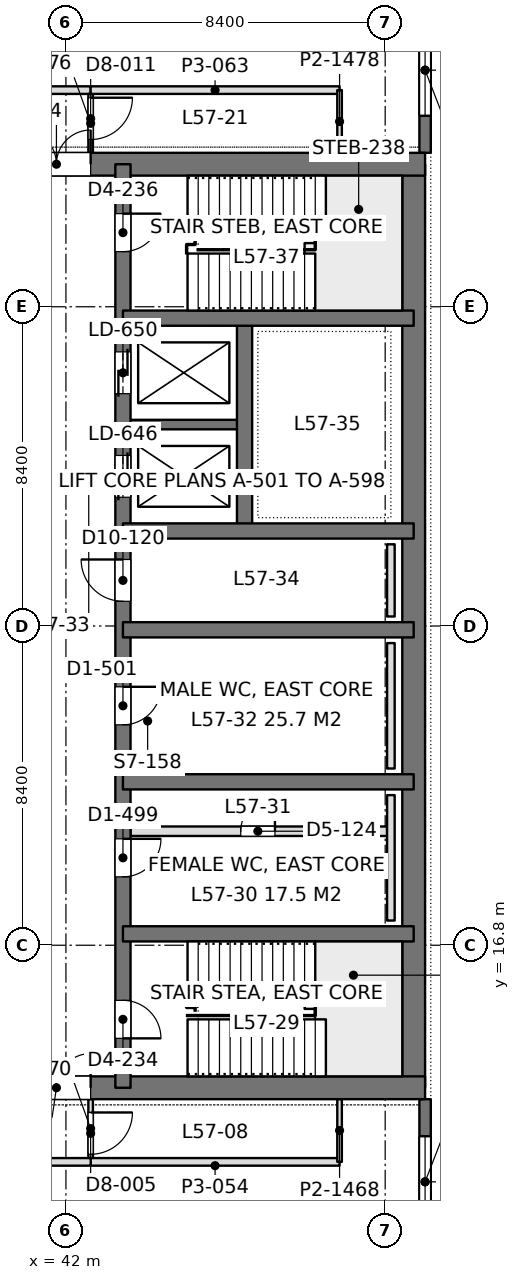
"""IFC4 building model, lengths in metres.
Left out: names, types, materials, properties, quantities, classifications, styles, units other than length and angle.
Written with IfcOpenShell. Run it as: python <this file> out.ifc"""

import sys

from ifc_helpers import new_model, si_unit, direction, frame, frame_2d, origin, place, context, subcontext, project, spatial, rectangle, extrude, element, fill, save


model = new_model("IFC4")
c1 = context("Model", 3, precision=1e-05, world=origin(), true_north=direction((0.0, 1.0)))
c2 = subcontext(c1, "Body", "Model", "MODEL_VIEW")
j1 = project(units=[si_unit("LENGTHUNIT", "METRE"), si_unit("PLANEANGLEUNIT", "RADIAN")], contexts=[c1])
p1 = place(None, origin())
s1 = spatial("IfcSite", under=j1, at=p1, CompositionType="ELEMENT")
p2 = place(p1, origin())
s2 = spatial("IfcBuilding", under=s1, at=p2, CompositionType="ELEMENT")
p3 = place(p2, frame((0.0, 0.0, 250.2)))
s3 = spatial("IfcBuildingStorey", under=s2, at=p3, CompositionType="ELEMENT", Elevation=250.2)
p4 = place(p3, frame((33.75, 13.05, 0.0), z_axis=(0.0, 0.0, 1.0), x_axis=(1.0, 0.0, 0.0)))
e1 = element("IfcWall", 1, at=p4, inside=s3, PredefinedType="SHEAR", context=c2, shape_type="SweptSolid", body=[
    extrude(rectangle(XDim=17.7, YDim=0.6, at=frame_2d((8.85, 0.0))), origin(), (0.0, 0.0, 1.0), 4.5),
])
p5 = place(p4, frame((7.1, 0.0, 0.0)))
e2 = element("IfcOpeningElement", 2, at=p5, cuts=e1, PredefinedType="OPENING", context=c2, shape_type="SweptSolid", body=[
    extrude(rectangle(XDim=1.8, YDim=2.4, at=frame_2d((0.9, 1.2))), frame((0.0, 0.31, 0.0), z_axis=(0.0, -1.0, 0.0), x_axis=(1.0, 0.0, 0.0)), (0.0, 0.0, 1.0), 0.62),
])
p6 = place(p3, frame((33.75, 37.35, 0.0), z_axis=(0.0, 0.0, 1.0), x_axis=(1.0, 0.0, 0.0)))
e3 = element("IfcWall", 3, at=p6, inside=s3, PredefinedType="SHEAR", context=c2, shape_type="SweptSolid", body=[
    extrude(rectangle(XDim=17.7, YDim=0.6, at=frame_2d((8.85, 0.0))), origin(), (0.0, 0.0, 1.0), 4.5),
])
p7 = place(p6, frame((7.1, 0.0, 0.0)))
e4 = element("IfcOpeningElement", 4, at=p7, cuts=e3, PredefinedType="OPENING", context=c2, shape_type="SweptSolid", body=[
    extrude(rectangle(XDim=1.8, YDim=2.4, at=frame_2d((0.9, 1.2))), frame((0.0, 0.31, 0.0), z_axis=(0.0, -1.0, 0.0), x_axis=(1.0, 0.0, 0.0)), (0.0, 0.0, 1.0), 0.62),
])
p8 = place(p3, frame((51.15, 13.05, 0.0), z_axis=(0.0, 0.0, 1.0), x_axis=(0.0, 1.0, 0.0)))
e5 = element("IfcWall", 5, at=p8, inside=s3, PredefinedType="SHEAR", context=c2, shape_type="SweptSolid", body=[
    extrude(rectangle(XDim=24.3, YDim=0.6, at=frame_2d((12.15, 0.0))), origin(), (0.0, 0.0, 1.0), 4.5),
])
p9 = place(p3, frame((43.5, 13.05, 0.0), z_axis=(0.0, 0.0, 1.0), x_axis=(0.0, 1.0, 0.0)))
e6 = element("IfcWall", 6, at=p9, inside=s3, PredefinedType="SHEAR", context=c2, shape_type="SweptSolid", body=[
    extrude(rectangle(XDim=24.3, YDim=0.4, at=frame_2d((12.15, 0.0))), origin(), (0.0, 0.0, 1.0), 4.5),
])
p10 = place(p9, frame((1.3, 0.0, 0.0)))
e7 = element("IfcOpeningElement", 7, at=p10, cuts=e6, PredefinedType="OPENING", context=c2, shape_type="SweptSolid", body=[
    extrude(rectangle(XDim=1.0, YDim=2.2, at=frame_2d((0.5, 1.1))), frame((0.0, 0.21, 0.0), z_axis=(0.0, -1.0, 0.0), x_axis=(1.0, 0.0, 0.0)), (0.0, 0.0, 1.0), 0.42),
])
p11 = place(p9, frame((22.0, 0.0, 0.0)))
e8 = element("IfcOpeningElement", 8, at=p11, cuts=e6, PredefinedType="OPENING", context=c2, shape_type="SweptSolid", body=[
    extrude(rectangle(XDim=1.0, YDim=2.2, at=frame_2d((0.5, 1.1))), frame((0.0, 0.21, 0.0), z_axis=(0.0, -1.0, 0.0), x_axis=(1.0, 0.0, 0.0)), (0.0, 0.0, 1.0), 0.42),
])
p12 = place(p9, frame((5.55, 0.0, 0.0)))
e9 = element("IfcOpeningElement", 9, at=p12, cuts=e6, PredefinedType="OPENING", context=c2, shape_type="SweptSolid", body=[
    extrude(rectangle(XDim=1.0, YDim=2.2, at=frame_2d((0.5, 1.1))), frame((0.0, 0.21, 0.0), z_axis=(0.0, -1.0, 0.0), x_axis=(1.0, 0.0, 0.0)), (0.0, 0.0, 1.0), 0.42),
])
p13 = place(p9, frame((9.55, 0.0, 0.0)))
e10 = element("IfcOpeningElement", 10, at=p13, cuts=e6, PredefinedType="OPENING", context=c2, shape_type="SweptSolid", body=[
    extrude(rectangle(XDim=1.0, YDim=2.2, at=frame_2d((0.5, 1.1))), frame((0.0, 0.21, 0.0), z_axis=(0.0, -1.0, 0.0), x_axis=(1.0, 0.0, 0.0)), (0.0, 0.0, 1.0), 0.42),
])
p14 = place(p9, frame((12.8, 0.0, 0.0)))
e11 = element("IfcOpeningElement", 11, at=p14, cuts=e6, PredefinedType="OPENING", context=c2, shape_type="SweptSolid", body=[
    extrude(rectangle(XDim=1.1, YDim=2.2, at=frame_2d((0.55, 1.1))), frame((0.0, 0.21, 0.0), z_axis=(0.0, -1.0, 0.0), x_axis=(1.0, 0.0, 0.0)), (0.0, 0.0, 1.0), 0.42),
])
p15 = place(p9, frame((15.538, 0.0, 0.0)))
e12 = element("IfcOpeningElement", 12, at=p15, cuts=e6, PredefinedType="OPENING", context=c2, shape_type="SweptSolid", body=[
    extrude(rectangle(XDim=1.1, YDim=2.2, at=frame_2d((0.55, 1.1))), frame((0.0, 0.21, 0.0), z_axis=(0.0, -1.0, 0.0), x_axis=(1.0, 0.0, 0.0)), (0.0, 0.0, 1.0), 0.42),
])
p16 = place(p9, frame((18.262, 0.0, 0.0)))
e13 = element("IfcOpeningElement", 13, at=p16, cuts=e6, PredefinedType="OPENING", context=c2, shape_type="SweptSolid", body=[
    extrude(rectangle(XDim=1.1, YDim=2.2, at=frame_2d((0.55, 1.1))), frame((0.0, 0.21, 0.0), z_axis=(0.0, -1.0, 0.0), x_axis=(1.0, 0.0, 0.0)), (0.0, 0.0, 1.0), 0.42),
])
for number, where, z_axis, x_axis in (
    (14, (51.15, 17.1, 0.0), (0.0, 0.0, 1.0), (-1.0, 0.0, 0.0)),
    (15, (51.15, 21.1, 0.0), (0.0, 0.0, 1.0), (-1.0, 0.0, 0.0)),
    (16, (51.15, 25.1, 0.0), (0.0, 0.0, 1.0), (-1.0, 0.0, 0.0)),
    (17, (51.15, 27.7, 0.0), (0.0, 0.0, 1.0), (-1.0, 0.0, 0.0)),
    (18, (51.15, 33.3, 0.0), (0.0, 0.0, 1.0), (-1.0, 0.0, 0.0)),
):
    element("IfcWall", number, at=place(p3, frame(where, z_axis=z_axis, x_axis=x_axis)), inside=s3, PredefinedType="SHEAR", context=c2, shape_type="SweptSolid", body=[
        extrude(rectangle(XDim=7.65, YDim=0.4, at=frame_2d((3.825, 0.0))), origin(), (0.0, 0.0, 1.0), 4.5),
    ])
p17 = place(p3, frame((46.7, 27.7, 0.0), z_axis=(0.0, 0.0, 1.0), x_axis=(0.0, 1.0, 0.0)))
e19 = element("IfcWall", 19, at=p17, inside=s3, PredefinedType="SHEAR", context=c2, shape_type="SweptSolid", body=[
    extrude(rectangle(XDim=5.6, YDim=0.4, at=frame_2d((2.8, 0.0))), origin(), (0.0, 0.0, 1.0), 4.5),
])
p18 = place(p3, frame((46.7, 30.5, 0.0), z_axis=(0.0, 0.0, 1.0), x_axis=(-1.0, 0.0, 0.0)))
e20 = element("IfcWall", 20, at=p18, inside=s3, PredefinedType="SHEAR", context=c2, shape_type="SweptSolid", body=[
    extrude(rectangle(XDim=3.2, YDim=0.25, at=frame_2d((1.6, 0.0))), origin(), (0.0, 0.0, 1.0), 4.5),
])
p19 = place(p3, frame((51.45, 42.0, 0.0), z_axis=(0.0, 0.0, 1.0), x_axis=(0.0, -1.0, 0.0)))
e21 = element("IfcWall", 21, at=p19, inside=s3, PredefinedType="SOLIDWALL", context=c2, shape_type="SweptSolid", body=[
    extrude(rectangle(XDim=4.35, YDim=0.3, at=frame_2d((2.175, 0.0))), origin(), (0.0, 0.0, 1.0), 4.35),
])
p20 = place(p19, frame((0.975, 0.0, 0.9)))
e22 = element("IfcOpeningElement", 22, at=p20, cuts=e21, PredefinedType="OPENING", context=c2, shape_type="SweptSolid", body=[
    extrude(rectangle(XDim=2.4, YDim=1.9, at=frame_2d((1.2, 0.95))), frame((0.0, 0.16, 0.0), z_axis=(0.0, -1.0, 0.0), x_axis=(1.0, 0.0, 0.0)), (0.0, 0.0, 1.0), 0.32),
])
p21 = place(p3, frame((51.45, 12.75, 0.0), z_axis=(0.0, 0.0, 1.0), x_axis=(0.0, -1.0, 0.0)))
e23 = element("IfcWall", 23, at=p21, inside=s3, PredefinedType="SOLIDWALL", context=c2, shape_type="SweptSolid", body=[
    extrude(rectangle(XDim=4.35, YDim=0.3, at=frame_2d((2.175, 0.0))), origin(), (0.0, 0.0, 1.0), 4.35),
])
p22 = place(p21, frame((0.975, 0.0, 0.9)))
e24 = element("IfcOpeningElement", 24, at=p22, cuts=e23, PredefinedType="OPENING", context=c2, shape_type="SweptSolid", body=[
    extrude(rectangle(XDim=2.4, YDim=1.9, at=frame_2d((1.2, 0.95))), frame((0.0, 0.16, 0.0), z_axis=(0.0, -1.0, 0.0), x_axis=(1.0, 0.0, 0.0)), (0.0, 0.0, 1.0), 0.32),
])
p23 = place(p3, frame((7.748, 11.1, 0.0), z_axis=(0.0, 0.0, 1.0), x_axis=(1.0, 0.0, 0.0)))
e25 = element("IfcWall", 25, at=p23, inside=s3, PredefinedType="PARTITIONING", context=c2, shape_type="SweptSolid", body=[
    extrude(rectangle(XDim=34.904, YDim=0.2, at=frame_2d((17.452, 0.0))), origin(), (0.0, 0.0, 1.0), 3.8),
])
p24 = place(p23, frame((10.735, 0.0, 0.0)))
e26 = element("IfcOpeningElement", 26, at=p24, cuts=e25, PredefinedType="OPENING", context=c2, shape_type="SweptSolid", body=[
    extrude(rectangle(XDim=1.8, YDim=2.2, at=frame_2d((0.9, 1.1))), frame((0.0, 0.11, 0.0), z_axis=(0.0, -1.0, 0.0), x_axis=(1.0, 0.0, 0.0)), (0.0, 0.0, 1.0), 0.22),
])
p25 = place(p23, frame((22.369, 0.0, 0.0)))
e27 = element("IfcOpeningElement", 27, at=p25, cuts=e25, PredefinedType="OPENING", context=c2, shape_type="SweptSolid", body=[
    extrude(rectangle(XDim=1.8, YDim=2.2, at=frame_2d((0.9, 1.1))), frame((0.0, 0.11, 0.0), z_axis=(0.0, -1.0, 0.0), x_axis=(1.0, 0.0, 0.0)), (0.0, 0.0, 1.0), 0.22),
])
p26 = place(p3, frame((42.65, 11.198, 0.0), z_axis=(0.0, 0.0, 1.0), x_axis=(0.0, 1.0, 0.0)))
e28 = element("IfcWall", 28, at=p26, inside=s3, PredefinedType="PARTITIONING", context=c2, shape_type="SweptSolid", body=[
    extrude(rectangle(XDim=1.554, YDim=0.12, at=frame_2d((0.777, 0.0))), origin(), (0.0, 0.0, 1.0), 4.35),
])
p27 = place(p26, frame((0.102, 0.0, 0.0)))
e29 = element("IfcOpeningElement", 29, at=p27, cuts=e28, PredefinedType="OPENING", context=c2, shape_type="SweptSolid", body=[
    extrude(rectangle(XDim=1.1, YDim=2.4, at=frame_2d((0.55, 1.2))), frame((0.0, 0.07, 0.0), z_axis=(0.0, -1.0, 0.0), x_axis=(1.0, 0.0, 0.0)), (0.0, 0.0, 1.0), 0.14),
])
p28 = place(p3, frame((42.648, 11.1, 0.0), z_axis=(0.0, 0.0, 1.0), x_axis=(1.0, 0.0, 0.0)))
e30 = element("IfcWall", 30, at=p28, inside=s3, PredefinedType="PARTITIONING", context=c2, shape_type="SweptSolid", body=[
    extrude(rectangle(XDim=6.552, YDim=0.2, at=frame_2d((3.276, 0.0))), origin(), (0.0, 0.0, 1.0), 4.35),
])
p29 = place(p3, frame((49.2, 11.1, 0.0), z_axis=(0.0, 0.0, 1.0), x_axis=(0.0, 1.0, 0.0)))
e31 = element("IfcWall", 31, at=p29, inside=s3, PredefinedType="PARTITIONING", context=c2, shape_type="SweptSolid", body=[
    extrude(rectangle(XDim=1.652, YDim=0.12, at=frame_2d((0.826, 0.0))), origin(), (0.0, 0.0, 1.0), 4.35),
])
p30 = place(p3, frame((7.748, 39.3, 0.0), z_axis=(0.0, 0.0, 1.0), x_axis=(1.0, 0.0, 0.0)))
e32 = element("IfcWall", 32, at=p30, inside=s3, PredefinedType="PARTITIONING", context=c2, shape_type="SweptSolid", body=[
    extrude(rectangle(XDim=34.904, YDim=0.2, at=frame_2d((17.452, 0.0))), origin(), (0.0, 0.0, 1.0), 3.8),
])
p31 = place(p30, frame((10.735, 0.0, 0.0)))
e33 = element("IfcOpeningElement", 33, at=p31, cuts=e32, PredefinedType="OPENING", context=c2, shape_type="SweptSolid", body=[
    extrude(rectangle(XDim=1.8, YDim=2.2, at=frame_2d((0.9, 1.1))), frame((0.0, 0.11, 0.0), z_axis=(0.0, -1.0, 0.0), x_axis=(1.0, 0.0, 0.0)), (0.0, 0.0, 1.0), 0.22),
])
p32 = place(p30, frame((22.369, 0.0, 0.0)))
e34 = element("IfcOpeningElement", 34, at=p32, cuts=e32, PredefinedType="OPENING", context=c2, shape_type="SweptSolid", body=[
    extrude(rectangle(XDim=1.8, YDim=2.2, at=frame_2d((0.9, 1.1))), frame((0.0, 0.11, 0.0), z_axis=(0.0, -1.0, 0.0), x_axis=(1.0, 0.0, 0.0)), (0.0, 0.0, 1.0), 0.22),
])
p33 = place(p3, frame((42.65, 37.648, 0.0), z_axis=(0.0, 0.0, 1.0), x_axis=(0.0, 1.0, 0.0)))
e35 = element("IfcWall", 35, at=p33, inside=s3, PredefinedType="PARTITIONING", context=c2, shape_type="SweptSolid", body=[
    extrude(rectangle(XDim=1.554, YDim=0.12, at=frame_2d((0.777, 0.0))), origin(), (0.0, 0.0, 1.0), 4.35),
])
p34 = place(p33, frame((0.352, 0.0, 0.0)))
e36 = element("IfcOpeningElement", 36, at=p34, cuts=e35, PredefinedType="OPENING", context=c2, shape_type="SweptSolid", body=[
    extrude(rectangle(XDim=1.1, YDim=2.4, at=frame_2d((0.55, 1.2))), frame((0.0, 0.07, 0.0), z_axis=(0.0, -1.0, 0.0), x_axis=(1.0, 0.0, 0.0)), (0.0, 0.0, 1.0), 0.14),
])
p35 = place(p3, frame((42.648, 39.3, 0.0), z_axis=(0.0, 0.0, 1.0), x_axis=(1.0, 0.0, 0.0)))
e37 = element("IfcWall", 37, at=p35, inside=s3, PredefinedType="PARTITIONING", context=c2, shape_type="SweptSolid", body=[
    extrude(rectangle(XDim=6.552, YDim=0.2, at=frame_2d((3.276, 0.0))), origin(), (0.0, 0.0, 1.0), 3.99),
])
p36 = place(p3, frame((49.2, 37.648, 0.0), z_axis=(0.0, 0.0, 1.0), x_axis=(0.0, 1.0, 0.0)))
e38 = element("IfcWall", 38, at=p36, inside=s3, PredefinedType="PARTITIONING", context=c2, shape_type="SweptSolid", body=[
    extrude(rectangle(XDim=1.652, YDim=0.12, at=frame_2d((0.826, 0.0))), origin(), (0.0, 0.0, 1.0), 4.35),
])
p37 = place(p3, frame((43.7, 19.8, 0.0), z_axis=(0.0, 0.0, 1.0), x_axis=(1.0, 0.0, 0.0)))
e39 = element("IfcWall", 39, at=p37, inside=s3, PredefinedType="PARTITIONING", context=c2, shape_type="SweptSolid", body=[
    extrude(rectangle(XDim=6.75, YDim=0.25, at=frame_2d((3.375, 0.0))), origin(), (0.0, 0.0, 1.0), 4.3),
])
p38 = place(p37, frame((2.9, 0.0, 0.0)))
e40 = element("IfcOpeningElement", 40, at=p38, cuts=e39, PredefinedType="OPENING", context=c2, shape_type="SweptSolid", body=[
    extrude(rectangle(XDim=0.9, YDim=2.2, at=frame_2d((0.45, 1.1))), frame((0.0, 0.135, 0.0), z_axis=(0.0, -1.0, 0.0), x_axis=(1.0, 0.0, 0.0)), (0.0, 0.0, 1.0), 0.27),
])
for number, where, z_axis, x_axis in (
    (41, (50.55, 17.45, 0.0), (0.0, 0.0, 1.0), (0.0, 1.0, 0.0)),
    (42, (50.55, 21.45, 0.0), (0.0, 0.0, 1.0), (0.0, 1.0, 0.0)),
):
    element("IfcWall", number, at=place(p3, frame(where, z_axis=z_axis, x_axis=x_axis)), inside=s3, PredefinedType="PLUMBINGWALL", context=c2, shape_type="SweptSolid", body=[
        extrude(rectangle(XDim=3.3, YDim=0.2, at=frame_2d((1.65, 0.0))), origin(), (0.0, 0.0, 1.0), 1.2),
    ])
p39 = place(p3, frame((50.55, 25.45, 0.0), z_axis=(0.0, 0.0, 1.0), x_axis=(0.0, 1.0, 0.0)))
e43 = element("IfcWall", 43, at=p39, inside=s3, PredefinedType="PLUMBINGWALL", context=c2, shape_type="SweptSolid", body=[
    extrude(rectangle(XDim=1.9, YDim=0.2, at=frame_2d((0.95, 0.0))), origin(), (0.0, 0.0, 1.0), 1.2),
])
p40 = place(p20, origin())
e44 = element("IfcWindow", 44, at=p40, inside=s3, PartitioningType="SINGLE_PANEL", PredefinedType="WINDOW", context=c2, shape_type="SweptSolid", body=[
    extrude(rectangle(XDim=2.4, YDim=1.9, at=frame_2d((1.2, 0.95))), frame((0.0, 0.03, 0.0), z_axis=(0.0, -1.0, 0.0), x_axis=(1.0, 0.0, 0.0)), (0.0, 0.0, 1.0), 0.06),
])
fill(e22, e44)
p41 = place(p22, origin())
e45 = element("IfcWindow", 45, at=p41, inside=s3, PartitioningType="SINGLE_PANEL", PredefinedType="WINDOW", context=c2, shape_type="SweptSolid", body=[
    extrude(rectangle(XDim=2.4, YDim=1.9, at=frame_2d((1.2, 0.95))), frame((0.0, 0.03, 0.0), z_axis=(0.0, -1.0, 0.0), x_axis=(1.0, 0.0, 0.0)), (0.0, 0.0, 1.0), 0.06),
])
fill(e24, e45)
p42 = place(p5, origin())
e46 = element("IfcDoor", 46, at=p42, inside=s3, OperationType="DOUBLE_DOOR_SINGLE_SWING", PredefinedType="DOOR", context=c2, shape_type="SweptSolid", body=[
    extrude(rectangle(XDim=1.8, YDim=2.4, at=frame_2d((0.9, 1.2))), frame((0.0, 0.025, 0.0), z_axis=(0.0, -1.0, 0.0), x_axis=(1.0, 0.0, 0.0)), (0.0, 0.0, 1.0), 0.05),
])
fill(e2, e46)
p43 = place(p7, origin())
e47 = element("IfcDoor", 47, at=p43, inside=s3, OperationType="DOUBLE_DOOR_SINGLE_SWING", PredefinedType="DOOR", context=c2, shape_type="SweptSolid", body=[
    extrude(rectangle(XDim=1.8, YDim=2.4, at=frame_2d((0.9, 1.2))), frame((0.0, 0.025, 0.0), z_axis=(0.0, -1.0, 0.0), x_axis=(1.0, 0.0, 0.0)), (0.0, 0.0, 1.0), 0.05),
])
fill(e4, e47)
p44 = place(p10, frame((1.0, 0.0, 0.0), z_axis=(0.0, 0.0, 1.0), x_axis=(-1.0, 0.0, 0.0)))
e48 = element("IfcDoor", 48, at=p44, inside=s3, OperationType="SINGLE_SWING_RIGHT", PredefinedType="DOOR", context=c2, shape_type="SweptSolid", body=[
    extrude(rectangle(XDim=1.0, YDim=2.2, at=frame_2d((0.5, 1.1))), frame((0.0, 0.025, 0.0), z_axis=(0.0, -1.0, 0.0), x_axis=(1.0, 0.0, 0.0)), (0.0, 0.0, 1.0), 0.05),
])
fill(e7, e48)
p45 = place(p11, frame((1.0, 0.0, 0.0), z_axis=(0.0, 0.0, 1.0), x_axis=(-1.0, 0.0, 0.0)))
e49 = element("IfcDoor", 49, at=p45, inside=s3, OperationType="SINGLE_SWING_LEFT", PredefinedType="DOOR", context=c2, shape_type="SweptSolid", body=[
    extrude(rectangle(XDim=1.0, YDim=2.2, at=frame_2d((0.5, 1.1))), frame((0.0, 0.025, 0.0), z_axis=(0.0, -1.0, 0.0), x_axis=(1.0, 0.0, 0.0)), (0.0, 0.0, 1.0), 0.05),
])
fill(e8, e49)
p46 = place(p12, frame((1.0, 0.0, 0.0), z_axis=(0.0, 0.0, 1.0), x_axis=(-1.0, 0.0, 0.0)))
e50 = element("IfcDoor", 50, at=p46, inside=s3, OperationType="SINGLE_SWING_LEFT", PredefinedType="DOOR", context=c2, shape_type="SweptSolid", body=[
    extrude(rectangle(XDim=1.0, YDim=2.2, at=frame_2d((0.5, 1.1))), frame((0.0, 0.025, 0.0), z_axis=(0.0, -1.0, 0.0), x_axis=(1.0, 0.0, 0.0)), (0.0, 0.0, 1.0), 0.05),
])
fill(e9, e50)
p47 = place(p13, frame((1.0, 0.0, 0.0), z_axis=(0.0, 0.0, 1.0), x_axis=(-1.0, 0.0, 0.0)))
e51 = element("IfcDoor", 51, at=p47, inside=s3, OperationType="SINGLE_SWING_LEFT", PredefinedType="DOOR", context=c2, shape_type="SweptSolid", body=[
    extrude(rectangle(XDim=1.0, YDim=2.2, at=frame_2d((0.5, 1.1))), frame((0.0, 0.025, 0.0), z_axis=(0.0, -1.0, 0.0), x_axis=(1.0, 0.0, 0.0)), (0.0, 0.0, 1.0), 0.05),
])
fill(e10, e51)
p48 = place(p14, origin())
e52 = element("IfcDoor", 52, at=p48, inside=s3, OperationType="SINGLE_SWING_RIGHT", PredefinedType="DOOR", context=c2, shape_type="SweptSolid", body=[
    extrude(rectangle(XDim=1.1, YDim=2.2, at=frame_2d((0.55, 1.1))), frame((0.0, 0.025, 0.0), z_axis=(0.0, -1.0, 0.0), x_axis=(1.0, 0.0, 0.0)), (0.0, 0.0, 1.0), 0.05),
])
fill(e11, e52)
p49 = place(p15, origin())
e53 = element("IfcDoor", 53, at=p49, inside=s3, OperationType="DOUBLE_DOOR_SLIDING", PredefinedType="DOOR", context=c2, shape_type="SweptSolid", body=[
    extrude(rectangle(XDim=1.1, YDim=2.2, at=frame_2d((0.55, 1.1))), frame((0.0, 0.025, 0.0), z_axis=(0.0, -1.0, 0.0), x_axis=(1.0, 0.0, 0.0)), (0.0, 0.0, 1.0), 0.05),
])
fill(e12, e53)
p50 = place(p16, origin())
e54 = element("IfcDoor", 54, at=p50, inside=s3, OperationType="DOUBLE_DOOR_SLIDING", PredefinedType="DOOR", context=c2, shape_type="SweptSolid", body=[
    extrude(rectangle(XDim=1.1, YDim=2.2, at=frame_2d((0.55, 1.1))), frame((0.0, 0.025, 0.0), z_axis=(0.0, -1.0, 0.0), x_axis=(1.0, 0.0, 0.0)), (0.0, 0.0, 1.0), 0.05),
])
fill(e13, e54)
p51 = place(p27, frame((1.1, 0.0, 0.0), z_axis=(0.0, 0.0, 1.0), x_axis=(-1.0, 0.0, 0.0)))
e55 = element("IfcDoor", 55, at=p51, inside=s3, OperationType="SINGLE_SWING_LEFT", PredefinedType="DOOR", context=c2, shape_type="SweptSolid", body=[
    extrude(rectangle(XDim=1.1, YDim=2.4, at=frame_2d((0.55, 1.2))), frame((0.0, 0.025, 0.0), z_axis=(0.0, -1.0, 0.0), x_axis=(1.0, 0.0, 0.0)), (0.0, 0.0, 1.0), 0.05),
])
fill(e29, e55)
p52 = place(p34, frame((1.1, 0.0, 0.0), z_axis=(0.0, 0.0, 1.0), x_axis=(-1.0, 0.0, 0.0)))
e56 = element("IfcDoor", 56, at=p52, inside=s3, OperationType="SINGLE_SWING_LEFT", PredefinedType="DOOR", context=c2, shape_type="SweptSolid", body=[
    extrude(rectangle(XDim=1.1, YDim=2.4, at=frame_2d((0.55, 1.2))), frame((0.0, 0.025, 0.0), z_axis=(0.0, -1.0, 0.0), x_axis=(1.0, 0.0, 0.0)), (0.0, 0.0, 1.0), 0.05),
])
fill(e36, e56)
p53 = place(p38, origin())
e57 = element("IfcDoor", 57, at=p53, inside=s3, OperationType="SINGLE_SWING_RIGHT", PredefinedType="DOOR", context=c2, shape_type="SweptSolid", body=[
    extrude(rectangle(XDim=0.9, YDim=2.2, at=frame_2d((0.45, 1.1))), frame((0.0, 0.025, 0.0), z_axis=(0.0, -1.0, 0.0), x_axis=(1.0, 0.0, 0.0)), (0.0, 0.0, 1.0), 0.05),
])
fill(e40, e57)
save(model, sys.argv[1])
